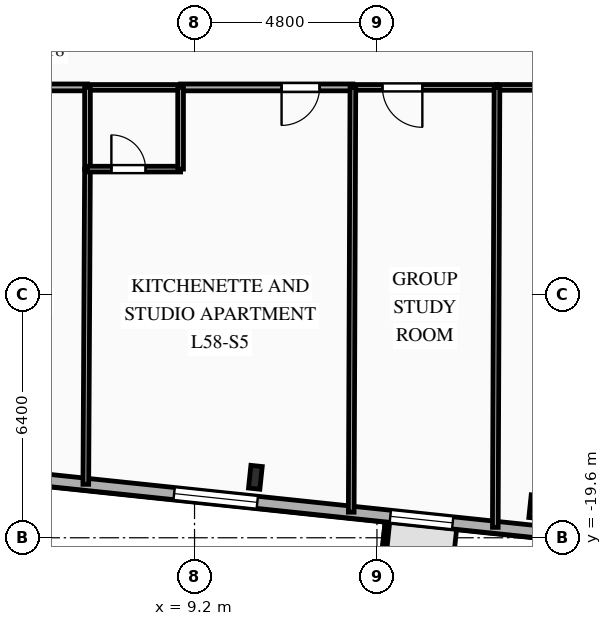
"""IFC4 building model, lengths in metres.
Left out: names, types, materials, properties, quantities, classifications, styles, units other than length and angle.
Written with IfcOpenShell. Run it as: python <this file> out.ifc"""

import sys

from ifc_helpers import new_model, si_unit, direction, frame, frame_2d, origin, origin_2d, place, context, subcontext, project, spatial, rectangle, i_section, extrude, element, fill, save


model = new_model("IFC4")
c1 = context("Model", 3, precision=1e-05, world=origin(), true_north=direction((0.0, 1.0)))
c2 = subcontext(c1, "Body", "Model", "MODEL_VIEW")
j1 = project(units=[si_unit("LENGTHUNIT", "METRE"), si_unit("PLANEANGLEUNIT", "RADIAN")], contexts=[c1])
p1 = place(None, origin())
s1 = spatial("IfcSite", under=j1, at=p1, CompositionType="ELEMENT")
p2 = place(p1, origin())
s2 = spatial("IfcBuilding", under=s1, at=p2, CompositionType="ELEMENT")
p3 = place(p2, frame((0.0, 0.0, 206.45)))
s3 = spatial("IfcBuildingStorey", under=s2, at=p3, CompositionType="ELEMENT", Elevation=206.45)
for number, where, z_axis, x_axis in (
    (1, (10.801, -18.009, 0.0), (0.0, 0.0, 1.0), (0.995, -0.105, 0.0)),
    (2, (18.177, -18.784, 0.0), (0.0, 0.0, 1.0), (0.995, -0.105, 0.0)),
):
    element("IfcColumn", number, at=place(p3, frame(where, z_axis=z_axis, x_axis=x_axis)), inside=s3, PredefinedType="COLUMN", context=c2, shape_type="SweptSolid", body=[
        extrude(i_section(OverallWidth=0.3, OverallDepth=0.6, WebThickness=0.015, FlangeThickness=0.03, FilletRadius=0.027, at=origin_2d()), origin(), (0.0, 0.0, 1.0), 3.35),
    ])
p4 = place(p3, frame((18.756, -19.498, 0.0), z_axis=(0.0, 0.0, 1.0), x_axis=(-0.994522060044, 0.104526896475, 0.0)))
e3 = element("IfcWall", 3, at=p4, inside=s3, PredefinedType="SOLIDWALL", context=c2, shape_type="SweptSolid", body=[
    extrude(rectangle(XDim=45.8, YDim=0.32, at=frame_2d((22.9, 0.0))), origin(), (0.0, 0.0, 1.0), 3.04),
])
p5 = place(p4, frame((2.778, 0.0, 0.85)))
e4 = element("IfcOpeningElement", 4, at=p5, cuts=e3, PredefinedType="OPENING", context=c2, shape_type="SweptSolid", body=[
    extrude(rectangle(XDim=1.65, YDim=1.85, at=frame_2d((0.825, 0.925))), frame((0.0, 0.17, 0.0), z_axis=(0.0, -1.0, 0.0), x_axis=(1.0, 0.0, 0.0)), (0.0, 0.0, 1.0), 0.34),
])
p6 = place(p4, frame((7.948, 0.0, 0.85)))
e5 = element("IfcOpeningElement", 5, at=p6, cuts=e3, PredefinedType="OPENING", context=c2, shape_type="SweptSolid", body=[
    extrude(rectangle(XDim=2.2, YDim=1.85, at=frame_2d((1.1, 0.925))), frame((0.0, 0.17, 0.0), z_axis=(0.0, -1.0, 0.0), x_axis=(1.0, 0.0, 0.0)), (0.0, 0.0, 1.0), 0.34),
])
p7 = place(p4, frame((14.954, 0.0, 0.85)))
e6 = element("IfcOpeningElement", 6, at=p7, cuts=e3, PredefinedType="OPENING", context=c2, shape_type="SweptSolid", body=[
    extrude(rectangle(XDim=2.2, YDim=1.85, at=frame_2d((1.1, 0.925))), frame((0.0, 0.17, 0.0), z_axis=(0.0, -1.0, 0.0), x_axis=(1.0, 0.0, 0.0)), (0.0, 0.0, 1.0), 0.34),
])
p8 = place(p4, frame((21.96, 0.0, 0.85)))
e7 = element("IfcOpeningElement", 7, at=p8, cuts=e3, PredefinedType="OPENING", context=c2, shape_type="SweptSolid", body=[
    extrude(rectangle(XDim=2.2, YDim=1.85, at=frame_2d((1.1, 0.925))), frame((0.0, 0.17, 0.0), z_axis=(0.0, -1.0, 0.0), x_axis=(1.0, 0.0, 0.0)), (0.0, 0.0, 1.0), 0.34),
])
p9 = place(p4, frame((29.006, 0.0, 0.85)))
e8 = element("IfcOpeningElement", 8, at=p9, cuts=e3, PredefinedType="OPENING", context=c2, shape_type="SweptSolid", body=[
    extrude(rectangle(XDim=2.2, YDim=1.85, at=frame_2d((1.1, 0.925))), frame((0.0, 0.17, 0.0), z_axis=(0.0, -1.0, 0.0), x_axis=(1.0, 0.0, 0.0)), (0.0, 0.0, 1.0), 0.34),
])
p10 = place(p4, frame((35.429, 0.0, 0.85)))
e9 = element("IfcOpeningElement", 9, at=p10, cuts=e3, PredefinedType="OPENING", context=c2, shape_type="SweptSolid", body=[
    extrude(rectangle(XDim=1.65, YDim=1.85, at=frame_2d((0.825, 0.925))), frame((0.0, 0.17, 0.0), z_axis=(0.0, -1.0, 0.0), x_axis=(1.0, 0.0, 0.0)), (0.0, 0.0, 1.0), 0.34),
])
p11 = place(p4, frame((41.212, 0.0, 0.85)))
e10 = element("IfcOpeningElement", 10, at=p11, cuts=e3, PredefinedType="OPENING", context=c2, shape_type="SweptSolid", body=[
    extrude(rectangle(XDim=1.65, YDim=1.85, at=frame_2d((0.825, 0.925))), frame((0.0, 0.17, 0.0), z_axis=(0.0, -1.0, 0.0), x_axis=(1.0, 0.0, 0.0)), (0.0, 0.0, 1.0), 0.34),
])
p12 = place(p3, frame((6.383, -7.75, 0.0), z_axis=(0.0, 0.0, 1.0), x_axis=(-1.0, 0.0, 0.0)))
e11 = element("IfcWall", 11, at=p12, inside=s3, PredefinedType="PARTITIONING", context=c2, shape_type="SweptSolid", body=[
    extrude(rectangle(XDim=4.533, YDim=0.18, at=frame_2d((2.267, 0.0))), origin(), (0.0, 0.0, 1.0), 3.04),
])
p13 = place(p12, frame((2.656, 0.0, 0.0)))
e12 = element("IfcOpeningElement", 12, at=p13, cuts=e11, PredefinedType="OPENING", context=c2, shape_type="SweptSolid", body=[
    extrude(rectangle(XDim=1.0, YDim=2.15, at=frame_2d((0.5, 1.075))), frame((0.0, 0.1, 0.0), z_axis=(0.0, -1.0, 0.0), x_axis=(1.0, 0.0, 0.0)), (0.0, 0.0, 1.0), 0.2),
])
p14 = place(p3, frame((13.367, -7.75, 0.0), z_axis=(0.0, 0.0, 1.0), x_axis=(-1.0, 0.0, 0.0)))
e13 = element("IfcWall", 13, at=p14, inside=s3, PredefinedType="PARTITIONING", context=c2, shape_type="SweptSolid", body=[
    extrude(rectangle(XDim=4.534, YDim=0.18, at=frame_2d((2.267, 0.0))), origin(), (0.0, 0.0, 1.0), 3.04),
])
p15 = place(p14, frame((0.877, 0.0, 0.0)))
e14 = element("IfcOpeningElement", 14, at=p15, cuts=e13, PredefinedType="OPENING", context=c2, shape_type="SweptSolid", body=[
    extrude(rectangle(XDim=1.0, YDim=2.15, at=frame_2d((0.5, 1.075))), frame((0.0, 0.1, 0.0), z_axis=(0.0, -1.0, 0.0), x_axis=(1.0, 0.0, 0.0)), (0.0, 0.0, 1.0), 0.2),
])
p16 = place(p3, frame((8.833, -7.75, 0.0), z_axis=(0.0, 0.0, 1.0), x_axis=(-1.0, 0.0, 0.0)))
e15 = element("IfcWall", 15, at=p16, inside=s3, PredefinedType="PLUMBINGWALL", context=c2, shape_type="SweptSolid", body=[
    extrude(rectangle(XDim=2.45, YDim=0.15, at=frame_2d((1.225, 0.0))), origin(), (0.0, 0.0, 1.0), 3.04),
])
p17 = place(p3, frame((17.158, -7.75, 0.0), z_axis=(0.0, 0.0, 1.0), x_axis=(-1.0, 0.0, 0.0)))
e16 = element("IfcWall", 16, at=p17, inside=s3, PredefinedType="PARTITIONING", context=c2, shape_type="SweptSolid", body=[
    extrude(rectangle(XDim=3.792, YDim=0.15, at=frame_2d((1.896, 0.0))), origin(), (0.0, 0.0, 1.0), 3.04),
])
p18 = place(p17, frame((1.964, 0.0, 0.0)))
e17 = element("IfcOpeningElement", 17, at=p18, cuts=e16, PredefinedType="OPENING", context=c2, shape_type="SweptSolid", body=[
    extrude(rectangle(XDim=1.05, YDim=2.15, at=frame_2d((0.525, 1.075))), frame((0.0, 0.085, 0.0), z_axis=(0.0, -1.0, 0.0), x_axis=(1.0, 0.0, 0.0)), (0.0, 0.0, 1.0), 0.17),
])
p19 = place(p3, frame((20.95, -7.75, 0.0), z_axis=(0.0, 0.0, 1.0), x_axis=(-1.0, 0.0, 0.0)))
e18 = element("IfcWall", 18, at=p19, inside=s3, PredefinedType="PARTITIONING", context=c2, shape_type="SweptSolid", body=[
    extrude(rectangle(XDim=3.792, YDim=0.15, at=frame_2d((1.896, 0.0))), origin(), (0.0, 0.0, 1.0), 3.04),
])
p20 = place(p19, frame((0.778, 0.0, 0.0)))
e19 = element("IfcOpeningElement", 19, at=p20, cuts=e18, PredefinedType="OPENING", context=c2, shape_type="SweptSolid", body=[
    extrude(rectangle(XDim=1.05, YDim=2.15, at=frame_2d((0.525, 1.075))), frame((0.0, 0.085, 0.0), z_axis=(0.0, -1.0, 0.0), x_axis=(1.0, 0.0, 0.0)), (0.0, 0.0, 1.0), 0.17),
])
p21 = place(p3, frame((6.383, -9.9, 0.0), z_axis=(0.0, 0.0, 1.0), x_axis=(-0.005298718667, -0.999985961692, 0.0)))
e20 = element("IfcWall", 20, at=p21, inside=s3, PredefinedType="PARTITIONING", context=c2, shape_type="SweptSolid", body=[
    extrude(rectangle(XDim=8.293, YDim=0.15, at=frame_2d((4.147, 0.0))), origin(), (0.0, 0.0, 1.0), 3.04),
])
p22 = place(p3, frame((6.383, -7.75, 0.0), z_axis=(0.0, 0.0, 1.0), x_axis=(0.0, -1.0, 0.0)))
e21 = element("IfcWall", 21, at=p22, inside=s3, PredefinedType="PLUMBINGWALL", context=c2, shape_type="SweptSolid", body=[
    extrude(rectangle(XDim=2.15, YDim=0.15, at=frame_2d((1.075, 0.0))), origin(), (0.0, 0.0, 1.0), 3.04),
])
p23 = place(p3, frame((6.383, -9.9, 0.0), z_axis=(0.0, 0.0, 1.0), x_axis=(1.0, 0.0, 0.0)))
e22 = element("IfcWall", 22, at=p23, inside=s3, PredefinedType="PLUMBINGWALL", context=c2, shape_type="SweptSolid", body=[
    extrude(rectangle(XDim=2.45, YDim=0.15, at=frame_2d((1.225, 0.0))), origin(), (0.0, 0.0, 1.0), 3.04),
])
p24 = place(p23, frame((0.629, 0.0, 0.0)))
e23 = element("IfcOpeningElement", 23, at=p24, cuts=e22, PredefinedType="OPENING", context=c2, shape_type="SweptSolid", body=[
    extrude(rectangle(XDim=0.9, YDim=2.1, at=frame_2d((0.45, 1.05))), frame((0.0, 0.085, 0.0), z_axis=(0.0, -1.0, 0.0), x_axis=(1.0, 0.0, 0.0)), (0.0, 0.0, 1.0), 0.17),
])
p25 = place(p3, frame((8.833, -9.9, 0.0), z_axis=(0.0, 0.0, 1.0), x_axis=(0.0, 1.0, 0.0)))
e24 = element("IfcWall", 24, at=p25, inside=s3, PredefinedType="PLUMBINGWALL", context=c2, shape_type="SweptSolid", body=[
    extrude(rectangle(XDim=2.15, YDim=0.15, at=frame_2d((1.075, 0.0))), origin(), (0.0, 0.0, 1.0), 3.04),
])
p26 = place(p3, frame((13.367, -7.75, 0.0), z_axis=(0.0, 0.0, 1.0), x_axis=(-0.003931559943, -0.999992271388, 0.0)))
e25 = element("IfcWall", 25, at=p26, inside=s3, PredefinedType="PARTITIONING", context=c2, shape_type="SweptSolid", body=[
    extrude(rectangle(XDim=11.177, YDim=0.15, at=frame_2d((5.589, 0.0))), origin(), (0.0, 0.0, 1.0), 3.04),
])
p27 = place(p3, frame((17.158, -7.75, 0.0), z_axis=(0.0, 0.0, 1.0), x_axis=(-0.003796239649, -0.999992794256, 0.0)))
e26 = element("IfcWall", 26, at=p27, inside=s3, PredefinedType="PARTITIONING", context=c2, shape_type="SweptSolid", body=[
    extrude(rectangle(XDim=11.576, YDim=0.15, at=frame_2d((5.788, 0.0))), origin(), (0.0, 0.0, 1.0), 3.04),
])
p28 = place(p5, origin())
e27 = element("IfcWindow", 27, at=p28, inside=s3, PartitioningType="SINGLE_PANEL", PredefinedType="WINDOW", context=c2, shape_type="SweptSolid", body=[
    extrude(rectangle(XDim=1.65, YDim=1.85, at=frame_2d((0.825, 0.925))), frame((0.0, 0.03, 0.0), z_axis=(0.0, -1.0, 0.0), x_axis=(1.0, 0.0, 0.0)), (0.0, 0.0, 1.0), 0.06),
])
fill(e4, e27)
p29 = place(p6, origin())
e28 = element("IfcWindow", 28, at=p29, inside=s3, PartitioningType="SINGLE_PANEL", PredefinedType="WINDOW", context=c2, shape_type="SweptSolid", body=[
    extrude(rectangle(XDim=2.2, YDim=1.85, at=frame_2d((1.1, 0.925))), frame((0.0, 0.03, 0.0), z_axis=(0.0, -1.0, 0.0), x_axis=(1.0, 0.0, 0.0)), (0.0, 0.0, 1.0), 0.06),
])
fill(e5, e28)
p30 = place(p15, origin())
e29 = element("IfcDoor", 29, at=p30, inside=s3, OperationType="SINGLE_SWING_RIGHT", PredefinedType="DOOR", context=c2, shape_type="SweptSolid", body=[
    extrude(rectangle(XDim=1.0, YDim=2.15, at=frame_2d((0.5, 1.075))), frame((0.0, 0.025, 0.0), z_axis=(0.0, -1.0, 0.0), x_axis=(1.0, 0.0, 0.0)), (0.0, 0.0, 1.0), 0.05),
])
fill(e14, e29)
p31 = place(p18, origin())
e30 = element("IfcDoor", 30, at=p31, inside=s3, OperationType="SINGLE_SWING_LEFT", PredefinedType="DOOR", context=c2, shape_type="SweptSolid", body=[
    extrude(rectangle(XDim=1.05, YDim=2.15, at=frame_2d((0.525, 1.075))), frame((0.0, 0.025, 0.0), z_axis=(0.0, -1.0, 0.0), x_axis=(1.0, 0.0, 0.0)), (0.0, 0.0, 1.0), 0.05),
])
fill(e17, e30)
p32 = place(p24, origin())
e31 = element("IfcDoor", 31, at=p32, inside=s3, OperationType="SINGLE_SWING_LEFT", PredefinedType="DOOR", context=c2, shape_type="SweptSolid", body=[
    extrude(rectangle(XDim=0.9, YDim=2.1, at=frame_2d((0.45, 1.05))), frame((0.0, 0.025, 0.0), z_axis=(0.0, -1.0, 0.0), x_axis=(1.0, 0.0, 0.0)), (0.0, 0.0, 1.0), 0.05),
])
fill(e23, e31)
save(model, sys.argv[1])
